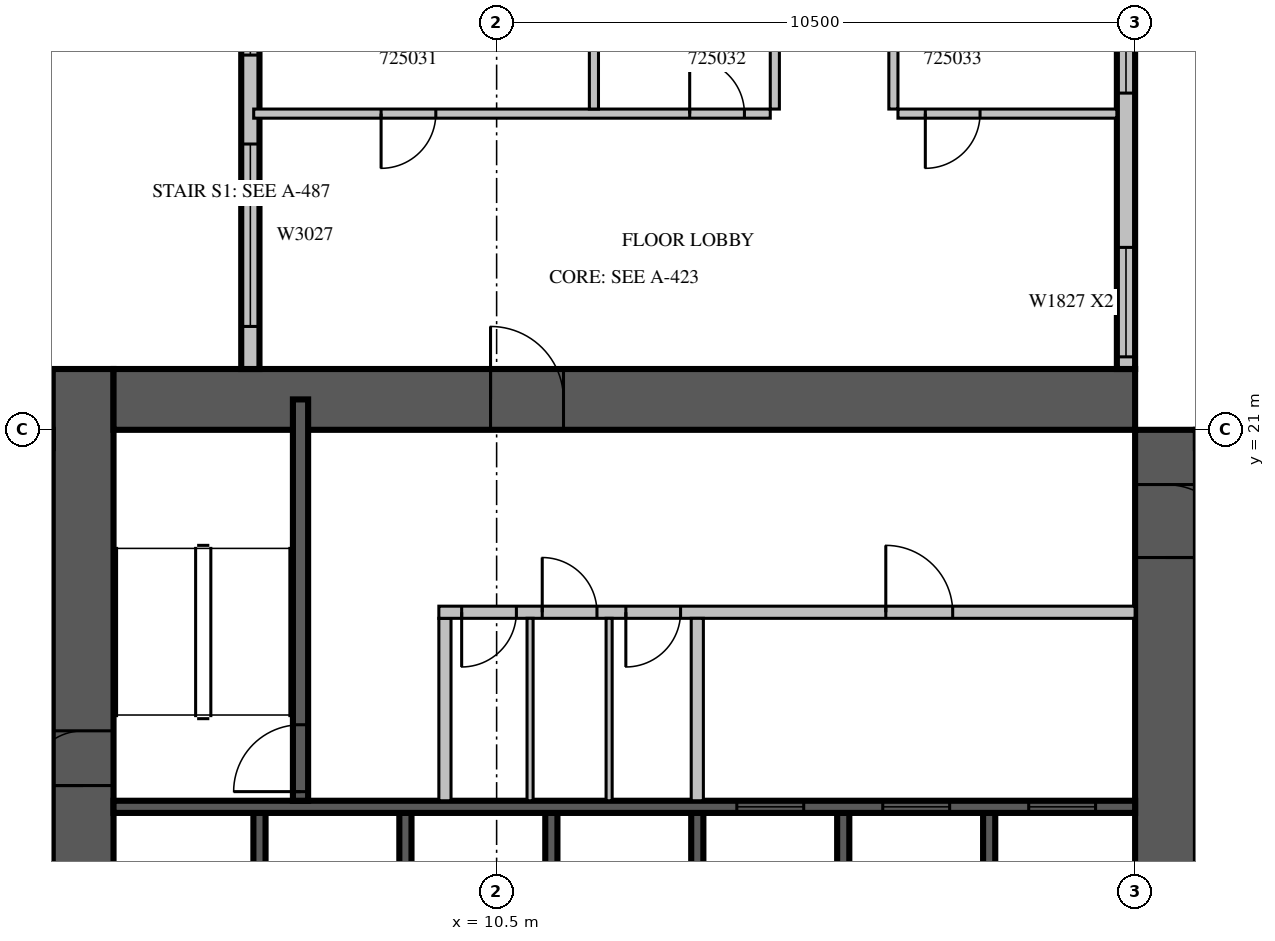
"""IFC4 building model, lengths in metres.
Left out: names, types, materials, properties, quantities, classifications, styles, units other than length and angle.
Written with IfcOpenShell. Run it as: python <this file> out.ifc"""

import sys

from ifc_helpers import new_model, si_unit, direction, frame, frame_2d, origin, place, context, subcontext, project, spatial, rectangle, extrude, source, transform, mapped, element, fill, save


model = new_model("IFC4")
c1 = context("Model", 3, precision=1e-05, world=origin(), true_north=direction((0.0, 1.0)))
c2 = subcontext(c1, "Body", "Model", "MODEL_VIEW")
j1 = project(units=[si_unit("LENGTHUNIT", "METRE"), si_unit("PLANEANGLEUNIT", "RADIAN")], contexts=[c1])
p1 = place(None, origin())
s1 = spatial("IfcSite", under=j1, at=p1, CompositionType="ELEMENT")
p2 = place(p1, origin())
s2 = spatial("IfcBuilding", under=s1, at=p2, CompositionType="ELEMENT")
p3 = place(p2, frame((0.0, 0.0, 116.1)))
s3 = spatial("IfcBuildingStorey", under=s2, at=p3, CompositionType="ELEMENT", Elevation=116.1)
m1 = source(origin(), c2, "Body", "SweptSolid", [
    extrude(rectangle(XDim=17.8, YDim=1.0, at=frame_2d((8.9, 0.0))), origin(), (0.0, 0.0, 1.0), 4.2),
])
p4 = place(p3, frame((3.7, 4.2, 0.0), z_axis=(0.0, 0.0, 1.0), x_axis=(0.0, 1.0, 0.0)))
e1 = element("IfcWall", 1, at=p4, inside=s3, PredefinedType="SHEAR", context=c2, shape_type="MappedRepresentation", body=[
    mapped(m1, transform((0.0, 0.0, 0.0), scale=1.0)),
])
m2 = source(origin(), c2, "Body", "SweptSolid", [
    extrude(rectangle(XDim=2.2, YDim=2.1, at=frame_2d((1.1, 1.05))), frame((0.0, 0.51, 0.0), z_axis=(0.0, -1.0, 0.0), x_axis=(1.0, 0.0, 0.0)), (0.0, 0.0, 1.0), 1.02),
])
p5 = place(p4, frame((4.2, 0.0, 0.0)))
e2 = element("IfcOpeningElement", 2, at=p5, cuts=e1, PredefinedType="OPENING", context=c2, shape_type="MappedRepresentation", body=[
    mapped(m2, transform((0.0, 0.0, 0.0), scale=1.0)),
])
m3 = source(origin(), c2, "Body", "SweptSolid", [
    extrude(rectangle(XDim=0.9, YDim=2.1, at=frame_2d((0.45, 1.05))), frame((0.0, 0.51, 0.0), z_axis=(0.0, -1.0, 0.0), x_axis=(1.0, 0.0, 0.0)), (0.0, 0.0, 1.0), 1.02),
])
p6 = place(p4, frame((10.95, 0.0, 0.0)))
e3 = element("IfcOpeningElement", 3, at=p6, cuts=e1, PredefinedType="OPENING", context=c2, shape_type="MappedRepresentation", body=[
    mapped(m3, transform((0.0, 0.0, 0.0), scale=1.0)),
])
m4 = source(origin(), c2, "Body", "SweptSolid", [
    extrude(rectangle(XDim=16.8, YDim=1.0, at=frame_2d((8.4, 0.0))), origin(), (0.0, 0.0, 1.0), 4.2),
])
p7 = place(p3, frame((21.5, 4.2, 0.0), z_axis=(0.0, 0.0, 1.0), x_axis=(0.0, 1.0, 0.0)))
e4 = element("IfcWall", 4, at=p7, inside=s3, PredefinedType="SHEAR", context=c2, shape_type="MappedRepresentation", body=[
    mapped(m4, transform((0.0, 0.0, 0.0), scale=1.0)),
])
p8 = place(p7, frame((4.2, 0.0, 0.0)))
e5 = element("IfcOpeningElement", 5, at=p8, cuts=e4, PredefinedType="OPENING", context=c2, shape_type="MappedRepresentation", body=[
    mapped(m2, transform((0.0, 0.0, 0.0), scale=1.0)),
])
m5 = source(origin(), c2, "Body", "SweptSolid", [
    extrude(rectangle(XDim=1.2, YDim=2.1, at=frame_2d((0.6, 1.05))), frame((0.0, 0.51, 0.0), z_axis=(0.0, -1.0, 0.0), x_axis=(1.0, 0.0, 0.0)), (0.0, 0.0, 1.0), 1.02),
])
p9 = place(p7, frame((14.7, 0.0, 0.0)))
e6 = element("IfcOpeningElement", 6, at=p9, cuts=e4, PredefinedType="OPENING", context=c2, shape_type="MappedRepresentation", body=[
    mapped(m5, transform((0.0, 0.0, 0.0), scale=1.0)),
])
p10 = place(p3, frame((4.2, 21.5, 0.0), z_axis=(0.0, 0.0, 1.0), x_axis=(1.0, 0.0, 0.0)))
e7 = element("IfcWall", 7, at=p10, inside=s3, PredefinedType="SHEAR", context=c2, shape_type="MappedRepresentation", body=[
    mapped(m4, transform((0.0, 0.0, 0.0), scale=1.0)),
])
p11 = place(p10, frame((6.2, 0.0, 0.0)))
e8 = element("IfcOpeningElement", 8, at=p11, cuts=e7, PredefinedType="OPENING", context=c2, shape_type="MappedRepresentation", body=[
    mapped(m5, transform((0.0, 0.0, 0.0), scale=1.0)),
])
m6 = source(origin(), c2, "Body", "SweptSolid", [
    extrude(rectangle(XDim=6.875, YDim=0.3, at=frame_2d((3.438, 0.0))), origin(), (0.0, 0.0, 1.0), 3.8),
])
p12 = place(p3, frame((20.85, 22.0, 0.0), z_axis=(0.0, 0.0, 1.0), x_axis=(0.0, 1.0, 0.0)))
e9 = element("IfcWall", 9, at=p12, inside=s3, PredefinedType="STANDARD", context=c2, shape_type="MappedRepresentation", body=[
    mapped(m6, transform((0.0, 0.0, 0.0), scale=1.0)),
])
m7 = source(origin(), c2, "Body", "SweptSolid", [
    extrude(rectangle(XDim=1.8, YDim=2.7, at=frame_2d((0.9, 1.35))), frame((0.0, 0.16, 0.0), z_axis=(0.0, -1.0, 0.0), x_axis=(1.0, 0.0, 0.0)), (0.0, 0.0, 1.0), 0.32),
])
p13 = place(p12, frame((0.2, 0.0, 0.6)))
e10 = element("IfcOpeningElement", 10, at=p13, cuts=e9, PredefinedType="OPENING", context=c2, shape_type="MappedRepresentation", body=[
    mapped(m7, transform((0.0, 0.0, 0.0), scale=1.0)),
])
p14 = place(p12, frame((4.537, 0.0, 0.6)))
e11 = element("IfcOpeningElement", 11, at=p14, cuts=e9, PredefinedType="OPENING", context=c2, shape_type="MappedRepresentation", body=[
    mapped(m7, transform((0.0, 0.0, 0.0), scale=1.0)),
])
m8 = source(origin(), c2, "Body", "SweptSolid", [
    extrude(rectangle(XDim=16.4, YDim=0.3, at=frame_2d((8.2, 0.0))), origin(), (0.0, 0.0, 1.0), 3.8),
])
p15 = place(p3, frame((6.45, 38.4, 0.0), z_axis=(0.0, 0.0, 1.0), x_axis=(0.0, -1.0, 0.0)))
e12 = element("IfcWall", 12, at=p15, inside=s3, PredefinedType="STANDARD", context=c2, shape_type="MappedRepresentation", body=[
    mapped(m8, transform((0.0, 0.0, 0.0), scale=1.0)),
])
p16 = place(p15, frame((1.15, 0.0, 0.6)))
e13 = element("IfcOpeningElement", 13, at=p16, cuts=e12, PredefinedType="OPENING", context=c2, shape_type="MappedRepresentation", body=[
    mapped(m7, transform((0.0, 0.0, 0.0), scale=1.0)),
])
p17 = place(p15, frame((5.162, 0.0, 0.6)))
e14 = element("IfcOpeningElement", 14, at=p17, cuts=e12, PredefinedType="OPENING", context=c2, shape_type="MappedRepresentation", body=[
    mapped(m7, transform((0.0, 0.0, 0.0), scale=1.0)),
])
p18 = place(p15, frame((9.438, 0.0, 0.6)))
e15 = element("IfcOpeningElement", 15, at=p18, cuts=e12, PredefinedType="OPENING", context=c2, shape_type="MappedRepresentation", body=[
    mapped(m7, transform((0.0, 0.0, 0.0), scale=1.0)),
])
m9 = source(origin(), c2, "Body", "SweptSolid", [
    extrude(rectangle(XDim=3.0, YDim=2.7, at=frame_2d((1.5, 1.35))), frame((0.0, 0.16, 0.0), z_axis=(0.0, -1.0, 0.0), x_axis=(1.0, 0.0, 0.0)), (0.0, 0.0, 1.0), 0.32),
])
p19 = place(p15, frame((12.7, 0.0, 0.6)))
e16 = element("IfcOpeningElement", 16, at=p19, cuts=e12, PredefinedType="OPENING", context=c2, shape_type="MappedRepresentation", body=[
    mapped(m9, transform((0.0, 0.0, 0.0), scale=1.0)),
])
m10 = source(origin(), c2, "Body", "SweptSolid", [
    extrude(rectangle(XDim=3.0, YDim=0.2, at=frame_2d((1.5, 0.0))), origin(), (0.0, 0.0, 1.0), 4.2),
])
for number, where, z_axis, x_axis in (
    (17, (6.6, 11.7, 0.0), (0.0, 0.0, 1.0), (0.0, 1.0, 0.0)),
    (18, (9.0, 11.7, 0.0), (0.0, 0.0, 1.0), (0.0, 1.0, 0.0)),
    (19, (11.4, 11.7, 0.0), (0.0, 0.0, 1.0), (0.0, 1.0, 0.0)),
    (20, (13.8, 11.7, 0.0), (0.0, 0.0, 1.0), (0.0, 1.0, 0.0)),
    (21, (16.2, 11.7, 0.0), (0.0, 0.0, 1.0), (0.0, 1.0, 0.0)),
    (22, (18.6, 11.7, 0.0), (0.0, 0.0, 1.0), (0.0, 1.0, 0.0)),
):
    element("IfcWall", number, at=place(p3, frame(where, z_axis=z_axis, x_axis=x_axis)), inside=s3, PredefinedType="SOLIDWALL", context=c2, shape_type="MappedRepresentation", body=[
        mapped(m10, transform((0.0, 0.0, 0.0), scale=1.0)),
    ])
m11 = source(origin(), c2, "Body", "SweptSolid", [
    extrude(rectangle(XDim=16.8, YDim=0.2, at=frame_2d((8.4, 0.0))), origin(), (0.0, 0.0, 1.0), 4.2),
])
p20 = place(p3, frame((4.2, 14.8, 0.0), z_axis=(0.0, 0.0, 1.0), x_axis=(1.0, 0.0, 0.0)))
e23 = element("IfcWall", 23, at=p20, inside=s3, PredefinedType="SOLIDWALL", context=c2, shape_type="MappedRepresentation", body=[
    mapped(m11, transform((0.0, 0.0, 0.0), scale=1.0)),
])
m12 = source(origin(), c2, "Body", "SweptSolid", [
    extrude(rectangle(XDim=1.1, YDim=2.1, at=frame_2d((0.55, 1.05))), frame((0.0, 0.11, 0.0), z_axis=(0.0, -1.0, 0.0), x_axis=(1.0, 0.0, 0.0)), (0.0, 0.0, 1.0), 0.22),
])
p21 = place(p20, frame((10.25, 0.0, 0.0)))
e24 = element("IfcOpeningElement", 24, at=p21, cuts=e23, PredefinedType="OPENING", context=c2, shape_type="MappedRepresentation", body=[
    mapped(m12, transform((0.0, 0.0, 0.0), scale=1.0)),
])
p22 = place(p20, frame((12.65, 0.0, 0.0)))
e25 = element("IfcOpeningElement", 25, at=p22, cuts=e23, PredefinedType="OPENING", context=c2, shape_type="MappedRepresentation", body=[
    mapped(m12, transform((0.0, 0.0, 0.0), scale=1.0)),
])
p23 = place(p20, frame((15.05, 0.0, 0.0)))
e26 = element("IfcOpeningElement", 26, at=p23, cuts=e23, PredefinedType="OPENING", context=c2, shape_type="MappedRepresentation", body=[
    mapped(m12, transform((0.0, 0.0, 0.0), scale=1.0)),
])
m13 = source(origin(), c2, "Body", "SweptSolid", [
    extrude(rectangle(XDim=6.6, YDim=0.25, at=frame_2d((3.3, 0.0))), origin(), (0.0, 0.0, 1.0), 3.8),
])
p24 = place(p3, frame((7.275, 14.9, 0.0), z_axis=(0.0, 0.0, 1.0), x_axis=(0.0, 1.0, 0.0)))
e27 = element("IfcWall", 27, at=p24, inside=s3, PredefinedType="SOLIDWALL", context=c2, shape_type="MappedRepresentation", body=[
    mapped(m13, transform((0.0, 0.0, 0.0), scale=1.0)),
])
m14 = source(origin(), c2, "Body", "SweptSolid", [
    extrude(rectangle(XDim=1.1, YDim=2.1, at=frame_2d((0.55, 1.05))), frame((0.0, 0.135, 0.0), z_axis=(0.0, -1.0, 0.0), x_axis=(1.0, 0.0, 0.0)), (0.0, 0.0, 1.0), 0.27),
])
p25 = place(p24, frame((0.15, 0.0, 0.0)))
e28 = element("IfcOpeningElement", 28, at=p25, cuts=e27, PredefinedType="OPENING", context=c2, shape_type="MappedRepresentation", body=[
    mapped(m14, transform((0.0, 0.0, 0.0), scale=1.0)),
])
m15 = source(origin(), c2, "Body", "SweptSolid", [
    extrude(rectangle(XDim=3.0, YDim=0.2, at=frame_2d((1.5, 0.0))), origin(), (0.0, 0.0, 1.0), 3.8),
])
p26 = place(p3, frame((9.65, 14.9, 0.0), z_axis=(0.0, 0.0, 1.0), x_axis=(0.0, 1.0, 0.0)))
e29 = element("IfcWall", 29, at=p26, inside=s3, PredefinedType="PARTITIONING", context=c2, shape_type="MappedRepresentation", body=[
    mapped(m15, transform((0.0, 0.0, 0.0), scale=1.0)),
])
m16 = source(origin(), c2, "Body", "SweptSolid", [
    extrude(rectangle(XDim=11.45, YDim=0.2, at=frame_2d((5.725, 0.0))), origin(), (0.0, 0.0, 1.0), 3.8),
])
p27 = place(p3, frame((9.55, 18.0, 0.0), z_axis=(0.0, 0.0, 1.0), x_axis=(1.0, 0.0, 0.0)))
e30 = element("IfcWall", 30, at=p27, inside=s3, PredefinedType="PARTITIONING", context=c2, shape_type="MappedRepresentation", body=[
    mapped(m16, transform((0.0, 0.0, 0.0), scale=1.0)),
])
m17 = source(origin(), c2, "Body", "SweptSolid", [
    extrude(rectangle(XDim=0.9, YDim=2.1, at=frame_2d((0.45, 1.05))), frame((0.0, 0.11, 0.0), z_axis=(0.0, -1.0, 0.0), x_axis=(1.0, 0.0, 0.0)), (0.0, 0.0, 1.0), 0.22),
])
p28 = place(p27, frame((0.375, 0.0, 0.0)))
e31 = element("IfcOpeningElement", 31, at=p28, cuts=e30, PredefinedType="OPENING", context=c2, shape_type="MappedRepresentation", body=[
    mapped(m17, transform((0.0, 0.0, 0.0), scale=1.0)),
])
p29 = place(p27, frame((1.7, 0.0, 0.0)))
e32 = element("IfcOpeningElement", 32, at=p29, cuts=e30, PredefinedType="OPENING", context=c2, shape_type="MappedRepresentation", body=[
    mapped(m17, transform((0.0, 0.0, 0.0), scale=1.0)),
])
p30 = place(p27, frame((3.075, 0.0, 0.0)))
e33 = element("IfcOpeningElement", 33, at=p30, cuts=e30, PredefinedType="OPENING", context=c2, shape_type="MappedRepresentation", body=[
    mapped(m17, transform((0.0, 0.0, 0.0), scale=1.0)),
])
p31 = place(p27, frame((7.35, 0.0, 0.0)))
e34 = element("IfcOpeningElement", 34, at=p31, cuts=e30, PredefinedType="OPENING", context=c2, shape_type="MappedRepresentation", body=[
    mapped(m12, transform((0.0, 0.0, 0.0), scale=1.0)),
])
p32 = place(p3, frame((13.8, 14.9, 0.0), z_axis=(0.0, 0.0, 1.0), x_axis=(0.0, 1.0, 0.0)))
e35 = element("IfcWall", 35, at=p32, inside=s3, PredefinedType="PARTITIONING", context=c2, shape_type="MappedRepresentation", body=[
    mapped(m15, transform((0.0, 0.0, 0.0), scale=1.0)),
])
m18 = source(origin(), c2, "Body", "SweptSolid", [
    extrude(rectangle(XDim=3.0, YDim=0.1, at=frame_2d((1.5, 0.0))), origin(), (0.0, 0.0, 1.0), 3.8),
])
for number, where, z_axis, x_axis in (
    (36, (11.05, 14.9, 0.0), (0.0, 0.0, 1.0), (0.0, 1.0, 0.0)),
    (37, (12.35, 14.9, 0.0), (0.0, 0.0, 1.0), (0.0, 1.0, 0.0)),
):
    element("IfcWall", number, at=place(p3, frame(where, z_axis=z_axis, x_axis=x_axis)), inside=s3, PredefinedType="PARTITIONING", context=c2, shape_type="MappedRepresentation", body=[
        mapped(m18, transform((0.0, 0.0, 0.0), scale=1.0)),
    ])
m19 = source(origin(), c2, "Body", "SweptSolid", [
    extrude(rectangle(XDim=8.495, YDim=0.15, at=frame_2d((4.247, 0.0))), origin(), (0.0, 0.0, 1.0), 3.8),
])
p33 = place(p3, frame((6.505, 26.2, 0.0), z_axis=(0.0, 0.0, 1.0), x_axis=(1.0, 0.0, 0.0)))
e38 = element("IfcWall", 38, at=p33, inside=s3, PredefinedType="PARTITIONING", context=c2, shape_type="MappedRepresentation", body=[
    mapped(m19, transform((0.0, 0.0, 0.0), scale=1.0)),
])
m20 = source(origin(), c2, "Body", "SweptSolid", [
    extrude(rectangle(XDim=0.9, YDim=2.1, at=frame_2d((0.45, 1.05))), frame((0.0, 0.085, 0.0), z_axis=(0.0, -1.0, 0.0), x_axis=(1.0, 0.0, 0.0)), (0.0, 0.0, 1.0), 0.17),
])
p34 = place(p33, frame((2.095, 0.0, 0.0)))
e39 = element("IfcOpeningElement", 39, at=p34, cuts=e38, PredefinedType="OPENING", context=c2, shape_type="MappedRepresentation", body=[
    mapped(m20, transform((0.0, 0.0, 0.0), scale=1.0)),
])
p35 = place(p33, frame((7.17, 0.0, 0.0)))
e40 = element("IfcOpeningElement", 40, at=p35, cuts=e38, PredefinedType="OPENING", context=c2, shape_type="MappedRepresentation", body=[
    mapped(m20, transform((0.0, 0.0, 0.0), scale=1.0)),
])
m21 = source(origin(), c2, "Body", "SweptSolid", [
    extrude(rectangle(XDim=3.6, YDim=0.15, at=frame_2d((1.8, 0.0))), origin(), (0.0, 0.0, 1.0), 3.8),
])
p36 = place(p3, frame((17.1, 26.2, 0.0), z_axis=(0.0, 0.0, 1.0), x_axis=(1.0, 0.0, 0.0)))
e41 = element("IfcWall", 41, at=p36, inside=s3, PredefinedType="PARTITIONING", context=c2, shape_type="MappedRepresentation", body=[
    mapped(m21, transform((0.0, 0.0, 0.0), scale=1.0)),
])
p37 = place(p36, frame((0.45, 0.0, 0.0)))
e42 = element("IfcOpeningElement", 42, at=p37, cuts=e41, PredefinedType="OPENING", context=c2, shape_type="MappedRepresentation", body=[
    mapped(m20, transform((0.0, 0.0, 0.0), scale=1.0)),
])
m22 = source(origin(), c2, "Body", "SweptSolid", [
    extrude(rectangle(XDim=3.05, YDim=0.15, at=frame_2d((1.525, 0.0))), origin(), (0.0, 0.0, 1.0), 3.8),
])
for number, where, z_axis, x_axis in (
    (43, (12.1, 26.275, 0.0), (0.0, 0.0, 1.0), (0.0, 1.0, 0.0)),
    (44, (15.075, 26.275, 0.0), (0.0, 0.0, 1.0), (0.0, 1.0, 0.0)),
    (45, (17.025, 29.325, 0.0), (0.0, 0.0, 1.0), (0.0, -1.0, 0.0)),
):
    element("IfcWall", number, at=place(p3, frame(where, z_axis=z_axis, x_axis=x_axis)), inside=s3, PredefinedType="PARTITIONING", context=c2, shape_type="MappedRepresentation", body=[
        mapped(m22, transform((0.0, 0.0, 0.0), scale=1.0)),
    ])
m23 = source(origin(), c2, "Body", "SweptSolid", [
    extrude(rectangle(XDim=1.8, YDim=2.7, at=frame_2d((0.9, 1.35))), frame((0.0, 0.03, 0.0), z_axis=(0.0, -1.0, 0.0), x_axis=(1.0, 0.0, 0.0)), (0.0, 0.0, 1.0), 0.06),
])
p38 = place(p13, origin())
e46 = element("IfcWindow", 46, at=p38, inside=s3, PartitioningType="SINGLE_PANEL", PredefinedType="WINDOW", context=c2, shape_type="MappedRepresentation", body=[
    mapped(m23, transform((0.0, 0.0, 0.0), scale=1.0)),
])
fill(e10, e46)
p39 = place(p14, origin())
e47 = element("IfcWindow", 47, at=p39, inside=s3, PartitioningType="SINGLE_PANEL", PredefinedType="WINDOW", context=c2, shape_type="MappedRepresentation", body=[
    mapped(m23, transform((0.0, 0.0, 0.0), scale=1.0)),
])
fill(e11, e47)
p40 = place(p18, origin())
e48 = element("IfcWindow", 48, at=p40, inside=s3, PartitioningType="SINGLE_PANEL", PredefinedType="WINDOW", context=c2, shape_type="MappedRepresentation", body=[
    mapped(m23, transform((0.0, 0.0, 0.0), scale=1.0)),
])
fill(e15, e48)
m24 = source(origin(), c2, "Body", "SweptSolid", [
    extrude(rectangle(XDim=3.0, YDim=2.7, at=frame_2d((1.5, 1.35))), frame((0.0, 0.03, 0.0), z_axis=(0.0, -1.0, 0.0), x_axis=(1.0, 0.0, 0.0)), (0.0, 0.0, 1.0), 0.06),
])
p41 = place(p19, origin())
e49 = element("IfcWindow", 49, at=p41, inside=s3, PartitioningType="SINGLE_PANEL", PredefinedType="WINDOW", context=c2, shape_type="MappedRepresentation", body=[
    mapped(m24, transform((0.0, 0.0, 0.0), scale=1.0)),
])
fill(e16, e49)
m25 = source(origin(), c2, "Body", "SweptSolid", [
    extrude(rectangle(XDim=1.1, YDim=2.1, at=frame_2d((0.55, 1.05))), frame((0.0, 0.025, 0.0), z_axis=(0.0, -1.0, 0.0), x_axis=(1.0, 0.0, 0.0)), (0.0, 0.0, 1.0), 0.05),
])
p42 = place(p21, origin())
e50 = element("IfcDoor", 50, at=p42, inside=s3, OperationType="SLIDING_TO_LEFT", PredefinedType="DOOR", context=c2, shape_type="MappedRepresentation", body=[
    mapped(m25, transform((0.0, 0.0, 0.0), scale=1.0)),
])
fill(e24, e50)
p43 = place(p22, origin())
e51 = element("IfcDoor", 51, at=p43, inside=s3, OperationType="SLIDING_TO_LEFT", PredefinedType="DOOR", context=c2, shape_type="MappedRepresentation", body=[
    mapped(m25, transform((0.0, 0.0, 0.0), scale=1.0)),
])
fill(e25, e51)
p44 = place(p23, origin())
e52 = element("IfcDoor", 52, at=p44, inside=s3, OperationType="SLIDING_TO_LEFT", PredefinedType="DOOR", context=c2, shape_type="MappedRepresentation", body=[
    mapped(m25, transform((0.0, 0.0, 0.0), scale=1.0)),
])
fill(e26, e52)
p45 = place(p25, origin())
e53 = element("IfcDoor", 53, at=p45, inside=s3, OperationType="SINGLE_SWING_LEFT", PredefinedType="DOOR", context=c2, shape_type="MappedRepresentation", body=[
    mapped(m25, transform((0.0, 0.0, 0.0), scale=1.0)),
])
fill(e28, e53)
m26 = source(origin(), c2, "Body", "SweptSolid", [
    extrude(rectangle(XDim=0.9, YDim=2.1, at=frame_2d((0.45, 1.05))), frame((0.0, 0.025, 0.0), z_axis=(0.0, -1.0, 0.0), x_axis=(1.0, 0.0, 0.0)), (0.0, 0.0, 1.0), 0.05),
])
p46 = place(p28, origin())
e54 = element("IfcDoor", 54, at=p46, inside=s3, OperationType="SINGLE_SWING_RIGHT", PredefinedType="DOOR", context=c2, shape_type="MappedRepresentation", body=[
    mapped(m26, transform((0.0, 0.0, 0.0), scale=1.0)),
])
fill(e31, e54)
p47 = place(p29, origin())
e55 = element("IfcDoor", 55, at=p47, inside=s3, OperationType="SINGLE_SWING_LEFT", PredefinedType="DOOR", context=c2, shape_type="MappedRepresentation", body=[
    mapped(m26, transform((0.0, 0.0, 0.0), scale=1.0)),
])
fill(e32, e55)
p48 = place(p30, origin())
e56 = element("IfcDoor", 56, at=p48, inside=s3, OperationType="SINGLE_SWING_RIGHT", PredefinedType="DOOR", context=c2, shape_type="MappedRepresentation", body=[
    mapped(m26, transform((0.0, 0.0, 0.0), scale=1.0)),
])
fill(e33, e56)
p49 = place(p31, origin())
e57 = element("IfcDoor", 57, at=p49, inside=s3, OperationType="SINGLE_SWING_LEFT", PredefinedType="DOOR", context=c2, shape_type="MappedRepresentation", body=[
    mapped(m25, transform((0.0, 0.0, 0.0), scale=1.0)),
])
fill(e34, e57)
m27 = source(origin(), c2, "Body", "SweptSolid", [
    extrude(rectangle(XDim=1.2, YDim=2.1, at=frame_2d((0.6, 1.05))), frame((0.0, 0.025, 0.0), z_axis=(0.0, -1.0, 0.0), x_axis=(1.0, 0.0, 0.0)), (0.0, 0.0, 1.0), 0.05),
])
p50 = place(p11, origin())
e58 = element("IfcDoor", 58, at=p50, inside=s3, OperationType="SINGLE_SWING_LEFT", PredefinedType="DOOR", context=c2, shape_type="MappedRepresentation", body=[
    mapped(m27, transform((0.0, 0.0, 0.0), scale=1.0)),
])
fill(e8, e58)
p51 = place(p9, origin())
e59 = element("IfcDoor", 59, at=p51, inside=s3, OperationType="SINGLE_SWING_RIGHT", PredefinedType="DOOR", context=c2, shape_type="MappedRepresentation", body=[
    mapped(m27, transform((0.0, 0.0, 0.0), scale=1.0)),
])
fill(e6, e59)
p52 = place(p6, origin())
e60 = element("IfcDoor", 60, at=p52, inside=s3, OperationType="SINGLE_SWING_LEFT", PredefinedType="DOOR", context=c2, shape_type="MappedRepresentation", body=[
    mapped(m26, transform((0.0, 0.0, 0.0), scale=1.0)),
])
fill(e3, e60)
p53 = place(p34, origin())
e61 = element("IfcDoor", 61, at=p53, inside=s3, OperationType="SINGLE_SWING_RIGHT", PredefinedType="DOOR", context=c2, shape_type="MappedRepresentation", body=[
    mapped(m26, transform((0.0, 0.0, 0.0), scale=1.0)),
])
fill(e39, e61)
p54 = place(p35, origin())
e62 = element("IfcDoor", 62, at=p54, inside=s3, OperationType="SINGLE_SWING_LEFT", PredefinedType="DOOR", context=c2, shape_type="MappedRepresentation", body=[
    mapped(m26, transform((0.0, 0.0, 0.0), scale=1.0)),
])
fill(e40, e62)
p55 = place(p37, origin())
e63 = element("IfcDoor", 63, at=p55, inside=s3, OperationType="SINGLE_SWING_RIGHT", PredefinedType="DOOR", context=c2, shape_type="MappedRepresentation", body=[
    mapped(m26, transform((0.0, 0.0, 0.0), scale=1.0)),
])
fill(e42, e63)
save(model, sys.argv[1])
